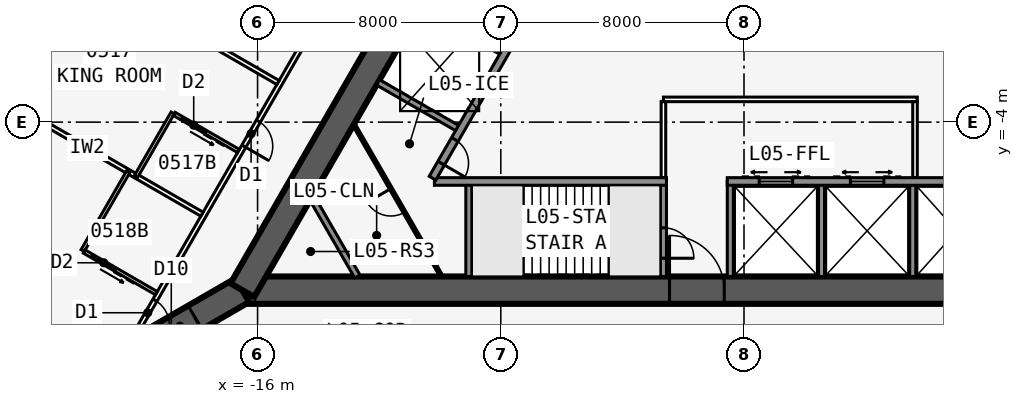
"""IFC4 building model, lengths in metres.
Left out: names, types, materials, properties, quantities, classifications, styles, units other than length and angle.
Written with IfcOpenShell. Run it as: python <this file> out.ifc"""

import sys

from ifc_helpers import new_model, si_unit, direction, frame, frame_2d, origin, place, context, subcontext, project, spatial, rectangle, extrude, element, fill, save


model = new_model("IFC4")
c1 = context("Model", 3, precision=1e-05, world=origin(), true_north=direction((0.0, 1.0)))
c2 = subcontext(c1, "Body", "Model", "MODEL_VIEW")
j1 = project(units=[si_unit("LENGTHUNIT", "METRE"), si_unit("PLANEANGLEUNIT", "RADIAN")], contexts=[c1])
p1 = place(None, origin())
s1 = spatial("IfcSite", under=j1, at=p1, CompositionType="ELEMENT")
p2 = place(p1, origin())
s2 = spatial("IfcBuilding", under=s1, at=p2, CompositionType="ELEMENT")
p3 = place(p2, frame((0.0, 0.0, 28.5)))
s3 = spatial("IfcBuildingStorey", under=s2, at=p3, CompositionType="ELEMENT", Elevation=28.5)
p4 = place(p3, frame((-16.5, -9.526, 0.0), z_axis=(0.0, 0.0, 1.0), x_axis=(1.0, 0.0, 0.0)))
e1 = element("IfcWall", 1, at=p4, inside=s3, PredefinedType="SHEAR", context=c2, shape_type="SweptSolid", body=[
    extrude(rectangle(XDim=33.0, YDim=0.9, at=frame_2d((16.5, 0.0))), origin(), (0.0, 0.0, 1.0), 3.4),
])
p5 = place(p4, frame((14.05, 0.0, 0.0)))
e2 = element("IfcOpeningElement", 2, at=p5, cuts=e1, PredefinedType="OPENING", context=c2, shape_type="SweptSolid", body=[
    extrude(rectangle(XDim=1.8, YDim=2.13, at=frame_2d((0.9, 1.065))), frame((0.0, 0.46, 0.0), z_axis=(0.0, -1.0, 0.0), x_axis=(1.0, 0.0, 0.0)), (0.0, 0.0, 1.0), 0.92),
])
p6 = place(p3, frame((-10.183, -5.951, 0.0), z_axis=(0.0, 0.0, 1.0), x_axis=(1.0, 0.0, 0.0)))
e3 = element("IfcWall", 3, at=p6, inside=s3, PredefinedType="SOLIDWALL", context=c2, shape_type="SweptSolid", body=[
    extrude(rectangle(XDim=7.633, YDim=0.25, at=frame_2d((3.816, 0.0))), origin(), (0.0, 0.0, 1.0), 3.235),
])
p7 = place(p3, frame((-0.55, -5.951, 0.0), z_axis=(0.0, 0.0, 1.0), x_axis=(1.0, 0.0, 0.0)))
e4 = element("IfcWall", 4, at=p7, inside=s3, PredefinedType="SOLIDWALL", context=c2, shape_type="SweptSolid", body=[
    extrude(rectangle(XDim=10.733, YDim=0.25, at=frame_2d((5.366, 0.0))), origin(), (0.0, 0.0, 1.0), 3.235),
])
p8 = place(p7, frame((9.314, 0.0, 0.0)))
e5 = element("IfcOpeningElement", 5, at=p8, cuts=e4, PredefinedType="OPENING", context=c2, shape_type="SweptSolid", body=[
    extrude(rectangle(XDim=0.9, YDim=2.13, at=frame_2d((0.45, 1.065))), frame((0.0, 0.135, 0.0), z_axis=(0.0, -1.0, 0.0), x_axis=(1.0, 0.0, 0.0)), (0.0, 0.0, 1.0), 0.27),
])
p9 = place(p7, frame((1.05, 0.0, 0.0)))
e6 = element("IfcOpeningElement", 6, at=p9, cuts=e4, PredefinedType="OPENING", context=c2, shape_type="SweptSolid", body=[
    extrude(rectangle(XDim=1.1, YDim=2.13, at=frame_2d((0.55, 1.065))), frame((0.0, 0.135, 0.0), z_axis=(0.0, -1.0, 0.0), x_axis=(1.0, 0.0, 0.0)), (0.0, 0.0, 1.0), 0.27),
])
p10 = place(p7, frame((4.05, 0.0, 0.0)))
e7 = element("IfcOpeningElement", 7, at=p10, cuts=e4, PredefinedType="OPENING", context=c2, shape_type="SweptSolid", body=[
    extrude(rectangle(XDim=1.1, YDim=2.13, at=frame_2d((0.55, 1.065))), frame((0.0, 0.135, 0.0), z_axis=(0.0, -1.0, 0.0), x_axis=(1.0, 0.0, 0.0)), (0.0, 0.0, 1.0), 0.27),
])
p11 = place(p3, frame((-9.05, -5.951, 0.0), z_axis=(0.0, 0.0, 1.0), x_axis=(0.0, -1.0, 0.0)))
e8 = element("IfcWall", 8, at=p11, inside=s3, PredefinedType="SOLIDWALL", context=c2, shape_type="SweptSolid", body=[
    extrude(rectangle(XDim=3.125, YDim=0.2, at=frame_2d((1.562, 0.0))), origin(), (0.0, 0.0, 1.0), 3.235),
])
p12 = place(p3, frame((-2.65, -5.951, 0.0), z_axis=(0.0, 0.0, 1.0), x_axis=(0.0, -1.0, 0.0)))
e9 = element("IfcWall", 9, at=p12, inside=s3, PredefinedType="SOLIDWALL", context=c2, shape_type="SweptSolid", body=[
    extrude(rectangle(XDim=3.125, YDim=0.2, at=frame_2d((1.562, 0.0))), origin(), (0.0, 0.0, 1.0), 3.235),
])
p13 = place(p12, frame((1.525, 0.0, 0.0)))
e10 = element("IfcOpeningElement", 10, at=p13, cuts=e9, PredefinedType="OPENING", context=c2, shape_type="SweptSolid", body=[
    extrude(rectangle(XDim=1.0, YDim=2.13, at=frame_2d((0.5, 1.065))), frame((0.0, 0.11, 0.0), z_axis=(0.0, -1.0, 0.0), x_axis=(1.0, 0.0, 0.0)), (0.0, 0.0, 1.0), 0.22),
])
for number, where, z_axis, x_axis in (
    (11, (-0.45, -5.951, 0.0), (0.0, 0.0, 1.0), (0.0, -1.0, 0.0)),
    (12, (2.55, -5.951, 0.0), (0.0, 0.0, 1.0), (0.0, -1.0, 0.0)),
    (13, (5.55, -5.951, 0.0), (0.0, 0.0, 1.0), (0.0, -1.0, 0.0)),
):
    element("IfcWall", number, at=place(p3, frame(where, z_axis=z_axis, x_axis=x_axis)), inside=s3, PredefinedType="SOLIDWALL", context=c2, shape_type="SweptSolid", body=[
        extrude(rectangle(XDim=3.125, YDim=0.2, at=frame_2d((1.562, 0.0))), origin(), (0.0, 0.0, 1.0), 3.235),
    ])
p14 = place(p3, frame((16.5, -9.526, 0.0), z_axis=(0.0, 0.0, 1.0), x_axis=(-0.499999749417, 0.866025548458, 0.0)))
e14 = element("IfcWall", 14, at=p14, inside=s3, PredefinedType="SHEAR", context=c2, shape_type="SweptSolid", body=[
    extrude(rectangle(XDim=33.0, YDim=0.9, at=frame_2d((16.5, 0.0))), origin(), (0.0, 0.0, 1.0), 3.4),
])
p15 = place(p14, frame((14.15, 0.0, 0.0)))
e15 = element("IfcOpeningElement", 15, at=p15, cuts=e14, PredefinedType="OPENING", context=c2, shape_type="SweptSolid", body=[
    extrude(rectangle(XDim=1.8, YDim=2.13, at=frame_2d((0.9, 1.065))), frame((0.0, 0.46, 0.0), z_axis=(0.0, -1.0, 0.0), x_axis=(1.0, 0.0, 0.0)), (0.0, 0.0, 1.0), 0.92),
])
p16 = place(p14, frame((12.6, 0.0, 0.0)))
e16 = element("IfcOpeningElement", 16, at=p16, cuts=e14, PredefinedType="OPENING", context=c2, shape_type="SweptSolid", body=[
    extrude(rectangle(XDim=1.0, YDim=2.13, at=frame_2d((0.5, 1.065))), frame((0.0, 0.46, 0.0), z_axis=(0.0, -1.0, 0.0), x_axis=(1.0, 0.0, 0.0)), (0.0, 0.0, 1.0), 0.92),
])
p17 = place(p3, frame((10.245, -5.843, 0.0), z_axis=(0.0, 0.0, 1.0), x_axis=(-0.499993009313, 0.866029439822, 0.0)))
e17 = element("IfcWall", 17, at=p17, inside=s3, PredefinedType="SOLIDWALL", context=c2, shape_type="SweptSolid", body=[
    extrude(rectangle(XDim=7.733, YDim=0.25, at=frame_2d((3.866, 0.0))), origin(), (0.0, 0.0, 1.0), 3.235),
])
p18 = place(p3, frame((0.0, 19.052, 0.0), z_axis=(0.0, 0.0, 1.0), x_axis=(-0.499999749417, -0.866025548458, 0.0)))
e18 = element("IfcWall", 18, at=p18, inside=s3, PredefinedType="SHEAR", context=c2, shape_type="SweptSolid", body=[
    extrude(rectangle(XDim=33.0, YDim=0.9, at=frame_2d((16.5, 0.0))), origin(), (0.0, 0.0, 1.0), 3.4),
])
p19 = place(p18, frame((14.15, 0.0, 0.0)))
e19 = element("IfcOpeningElement", 19, at=p19, cuts=e18, PredefinedType="OPENING", context=c2, shape_type="SweptSolid", body=[
    extrude(rectangle(XDim=1.8, YDim=2.13, at=frame_2d((0.9, 1.065))), frame((0.0, 0.46, 0.0), z_axis=(0.0, -1.0, 0.0), x_axis=(1.0, 0.0, 0.0)), (0.0, 0.0, 1.0), 0.92),
])
p20 = place(p18, frame((12.6, 0.0, 0.0)))
e20 = element("IfcOpeningElement", 20, at=p20, cuts=e18, PredefinedType="OPENING", context=c2, shape_type="SweptSolid", body=[
    extrude(rectangle(XDim=1.0, YDim=2.13, at=frame_2d((0.5, 1.065))), frame((0.0, 0.46, 0.0), z_axis=(0.0, -1.0, 0.0), x_axis=(1.0, 0.0, 0.0)), (0.0, 0.0, 1.0), 0.92),
])
p21 = place(p3, frame((-4.929, 3.365, 0.0), z_axis=(0.0, 0.0, 1.0), x_axis=(-0.499991433582, -0.866030349552, 0.0)))
e21 = element("IfcWall", 21, at=p21, inside=s3, PredefinedType="SOLIDWALL", context=c2, shape_type="SweptSolid", body=[
    extrude(rectangle(XDim=10.633, YDim=0.25, at=frame_2d((5.316, 0.0))), origin(), (0.0, 0.0, 1.0), 3.235),
])
p22 = place(p21, frame((9.164, 0.0, 0.0)))
e22 = element("IfcOpeningElement", 22, at=p22, cuts=e21, PredefinedType="OPENING", context=c2, shape_type="SweptSolid", body=[
    extrude(rectangle(XDim=0.9, YDim=2.13, at=frame_2d((0.45, 1.065))), frame((0.0, 0.135, 0.0), z_axis=(0.0, -1.0, 0.0), x_axis=(1.0, 0.0, 0.0)), (0.0, 0.0, 1.0), 0.27),
])
for number, where, z_axis, x_axis in (
    (23, (-7.879, -1.744, 0.0), (0.0, 0.0, 1.0), (-0.866, 0.5, 0.0)),
    (24, (-9.329, -4.256, 0.0), (0.0, 0.0, 1.0), (-0.866, 0.5, 0.0)),
):
    element("IfcWall", number, at=place(p3, frame(where, z_axis=z_axis, x_axis=x_axis)), inside=s3, PredefinedType="SOLIDWALL", context=c2, shape_type="SweptSolid", body=[
        extrude(rectangle(XDim=3.125, YDim=0.2, at=frame_2d((1.562, 0.0))), origin(), (0.0, 0.0, 1.0), 3.235),
    ])
p23 = place(p3, frame((-16.5, -9.526, 0.0), z_axis=(0.0, 0.0, 1.0), x_axis=(-0.866031398331, -0.499989616998, 0.0)))
e25 = element("IfcWall", 25, at=p23, inside=s3, PredefinedType="SHEAR", context=c2, shape_type="SweptSolid", body=[
    extrude(rectangle(XDim=4.746, YDim=0.9, at=frame_2d((2.373, 0.0))), origin(), (0.0, 0.0, 1.0), 3.4),
])
p24 = place(p23, frame((1.8, 0.0, 0.0)))
e26 = element("IfcOpeningElement", 26, at=p24, cuts=e25, PredefinedType="OPENING", context=c2, shape_type="SweptSolid", body=[
    extrude(rectangle(XDim=1.8, YDim=2.13, at=frame_2d((0.9, 1.065))), frame((0.0, 0.46, 0.0), z_axis=(0.0, -1.0, 0.0), x_axis=(1.0, 0.0, 0.0)), (0.0, 0.0, 1.0), 0.92),
])
p25 = place(p3, frame((20.027, -10.985, 0.0), z_axis=(0.0, 0.0, 1.0), x_axis=(-0.500001677587, 0.866024435227, 0.0)))
e27 = element("IfcWall", 27, at=p25, inside=s3, PredefinedType="PARTITIONING", context=c2, shape_type="SweptSolid", body=[
    extrude(rectangle(XDim=39.054, YDim=0.15, at=frame_2d((19.527, 0.0))), origin(), (0.0, 0.0, 1.0), 3.235),
])
p26 = place(p25, frame((0.352, 0.0, 0.0)))
e28 = element("IfcOpeningElement", 28, at=p26, cuts=e27, PredefinedType="OPENING", context=c2, shape_type="SweptSolid", body=[
    extrude(rectangle(XDim=0.95, YDim=2.13, at=frame_2d((0.475, 1.065))), frame((0.0, 0.085, 0.0), z_axis=(0.0, -1.0, 0.0), x_axis=(1.0, 0.0, 0.0)), (0.0, 0.0, 1.0), 0.17),
])
p27 = place(p25, frame((5.952, 0.0, 0.0)))
e29 = element("IfcOpeningElement", 29, at=p27, cuts=e27, PredefinedType="OPENING", context=c2, shape_type="SweptSolid", body=[
    extrude(rectangle(XDim=0.95, YDim=2.13, at=frame_2d((0.475, 1.065))), frame((0.0, 0.085, 0.0), z_axis=(0.0, -1.0, 0.0), x_axis=(1.0, 0.0, 0.0)), (0.0, 0.0, 1.0), 0.17),
])
p28 = place(p25, frame((12.152, 0.0, 0.0)))
e30 = element("IfcOpeningElement", 30, at=p28, cuts=e27, PredefinedType="OPENING", context=c2, shape_type="SweptSolid", body=[
    extrude(rectangle(XDim=0.95, YDim=2.13, at=frame_2d((0.475, 1.065))), frame((0.0, 0.085, 0.0), z_axis=(0.0, -1.0, 0.0), x_axis=(1.0, 0.0, 0.0)), (0.0, 0.0, 1.0), 0.17),
])
p29 = place(p25, frame((15.952, 0.0, 0.0)))
e31 = element("IfcOpeningElement", 31, at=p29, cuts=e27, PredefinedType="OPENING", context=c2, shape_type="SweptSolid", body=[
    extrude(rectangle(XDim=0.95, YDim=2.13, at=frame_2d((0.475, 1.065))), frame((0.0, 0.085, 0.0), z_axis=(0.0, -1.0, 0.0), x_axis=(1.0, 0.0, 0.0)), (0.0, 0.0, 1.0), 0.17),
])
p30 = place(p25, frame((22.152, 0.0, 0.0)))
e32 = element("IfcOpeningElement", 32, at=p30, cuts=e27, PredefinedType="OPENING", context=c2, shape_type="SweptSolid", body=[
    extrude(rectangle(XDim=0.95, YDim=2.13, at=frame_2d((0.475, 1.065))), frame((0.0, 0.085, 0.0), z_axis=(0.0, -1.0, 0.0), x_axis=(1.0, 0.0, 0.0)), (0.0, 0.0, 1.0), 0.17),
])
p31 = place(p25, frame((25.952, 0.0, 0.0)))
e33 = element("IfcOpeningElement", 33, at=p31, cuts=e27, PredefinedType="OPENING", context=c2, shape_type="SweptSolid", body=[
    extrude(rectangle(XDim=0.95, YDim=2.13, at=frame_2d((0.475, 1.065))), frame((0.0, 0.085, 0.0), z_axis=(0.0, -1.0, 0.0), x_axis=(1.0, 0.0, 0.0)), (0.0, 0.0, 1.0), 0.17),
])
p32 = place(p25, frame((36.546, 0.0, 0.0)))
e34 = element("IfcOpeningElement", 34, at=p32, cuts=e27, PredefinedType="OPENING", context=c2, shape_type="SweptSolid", body=[
    extrude(rectangle(XDim=0.95, YDim=2.13, at=frame_2d((0.475, 1.065))), frame((0.0, 0.085, 0.0), z_axis=(0.0, -1.0, 0.0), x_axis=(1.0, 0.0, 0.0)), (0.0, 0.0, 1.0), 0.17),
])
p33 = place(p3, frame((-0.5, 22.836, 0.0), z_axis=(0.0, 0.0, 1.0), x_axis=(-0.500001677587, -0.866024435227, 0.0)))
e35 = element("IfcWall", 35, at=p33, inside=s3, PredefinedType="PARTITIONING", context=c2, shape_type="SweptSolid", body=[
    extrude(rectangle(XDim=39.054, YDim=0.15, at=frame_2d((19.527, 0.0))), origin(), (0.0, 0.0, 1.0), 3.235),
])
p34 = place(p33, frame((1.558, 0.0, 0.0)))
e36 = element("IfcOpeningElement", 36, at=p34, cuts=e35, PredefinedType="OPENING", context=c2, shape_type="SweptSolid", body=[
    extrude(rectangle(XDim=0.95, YDim=2.13, at=frame_2d((0.475, 1.065))), frame((0.0, 0.085, 0.0), z_axis=(0.0, -1.0, 0.0), x_axis=(1.0, 0.0, 0.0)), (0.0, 0.0, 1.0), 0.17),
])
p35 = place(p33, frame((15.352, 0.0, 0.0)))
e37 = element("IfcOpeningElement", 37, at=p35, cuts=e35, PredefinedType="OPENING", context=c2, shape_type="SweptSolid", body=[
    extrude(rectangle(XDim=0.95, YDim=2.13, at=frame_2d((0.475, 1.065))), frame((0.0, 0.085, 0.0), z_axis=(0.0, -1.0, 0.0), x_axis=(1.0, 0.0, 0.0)), (0.0, 0.0, 1.0), 0.17),
])
p36 = place(p33, frame((22.752, 0.0, 0.0)))
e38 = element("IfcOpeningElement", 38, at=p36, cuts=e35, PredefinedType="OPENING", context=c2, shape_type="SweptSolid", body=[
    extrude(rectangle(XDim=0.95, YDim=2.13, at=frame_2d((0.475, 1.065))), frame((0.0, 0.085, 0.0), z_axis=(0.0, -1.0, 0.0), x_axis=(1.0, 0.0, 0.0)), (0.0, 0.0, 1.0), 0.17),
])
p37 = place(p33, frame((30.952, 0.0, 0.0)))
e39 = element("IfcOpeningElement", 39, at=p37, cuts=e35, PredefinedType="OPENING", context=c2, shape_type="SweptSolid", body=[
    extrude(rectangle(XDim=0.95, YDim=2.13, at=frame_2d((0.475, 1.065))), frame((0.0, 0.085, 0.0), z_axis=(0.0, -1.0, 0.0), x_axis=(1.0, 0.0, 0.0)), (0.0, 0.0, 1.0), 0.17),
])
p38 = place(p33, frame((37.752, 0.0, 0.0)))
e40 = element("IfcOpeningElement", 40, at=p38, cuts=e35, PredefinedType="OPENING", context=c2, shape_type="SweptSolid", body=[
    extrude(rectangle(XDim=0.95, YDim=2.13, at=frame_2d((0.475, 1.065))), frame((0.0, 0.085, 0.0), z_axis=(0.0, -1.0, 0.0), x_axis=(1.0, 0.0, 0.0)), (0.0, 0.0, 1.0), 0.17),
])
p39 = place(p3, frame((-15.329, -2.697, 0.0), z_axis=(0.0, 0.0, 1.0), x_axis=(-0.866018409083, 0.500012114982, 0.0)))
e41 = element("IfcWall", 41, at=p39, inside=s3, PredefinedType="PARTITIONING", context=c2, shape_type="SweptSolid", body=[
    extrude(rectangle(XDim=9.485, YDim=0.15, at=frame_2d((4.742, 0.0))), origin(), (0.0, 0.0, 1.0), 2.389),
])
p40 = place(p3, frame((-17.829, -7.027, 0.0), z_axis=(0.0, 0.0, 1.0), x_axis=(-0.866032659912, 0.499987431809, 0.0)))
e42 = element("IfcWall", 42, at=p40, inside=s3, PredefinedType="PARTITIONING", context=c2, shape_type="SweptSolid", body=[
    extrude(rectangle(XDim=8.72, YDim=0.15, at=frame_2d((4.36, 0.0))), origin(), (0.0, 0.0, 1.0), 2.389),
])
p41 = place(p3, frame((-18.793, -3.699, 0.0), z_axis=(0.0, 0.0, 1.0), x_axis=(-0.500001309137, -0.866024647952, 0.0)))
e43 = element("IfcWall", 43, at=p41, inside=s3, PredefinedType="PLUMBINGWALL", context=c2, shape_type="SweptSolid", body=[
    extrude(rectangle(XDim=2.4, YDim=0.12, at=frame_2d((1.2, 0.0))), origin(), (0.0, 0.0, 1.0), 3.235),
])
p42 = place(p3, frame((-16.628, -4.949, 0.0), z_axis=(0.0, 0.0, 1.0), x_axis=(-0.866048967903, 0.499959183527, 0.0)))
e44 = element("IfcWall", 44, at=p42, inside=s3, PredefinedType="PLUMBINGWALL", context=c2, shape_type="SweptSolid", body=[
    extrude(rectangle(XDim=2.44, YDim=0.12, at=frame_2d((1.22, 0.0))), origin(), (0.0, 0.0, 1.0), 3.235),
])
p43 = place(p42, frame((1.25, 0.0, 0.0)))
e45 = element("IfcOpeningElement", 45, at=p43, cuts=e44, PredefinedType="OPENING", context=c2, shape_type="SweptSolid", body=[
    extrude(rectangle(XDim=0.9, YDim=2.13, at=frame_2d((0.45, 1.065))), frame((0.0, 0.07, 0.0), z_axis=(0.0, -1.0, 0.0), x_axis=(1.0, 0.0, 0.0)), (0.0, 0.0, 1.0), 0.14),
])
p44 = place(p3, frame((-20.253, -5.627, 0.0), z_axis=(0.0, 0.0, 1.0), x_axis=(-0.499990139034, -0.866031096941, 0.0)))
e46 = element("IfcWall", 46, at=p44, inside=s3, PredefinedType="PLUMBINGWALL", context=c2, shape_type="SweptSolid", body=[
    extrude(rectangle(XDim=3.0, YDim=0.12, at=frame_2d((1.5, 0.0))), origin(), (0.0, 0.0, 1.0), 3.235),
])
p45 = place(p3, frame((-19.329, -9.625, 0.0), z_axis=(0.0, 0.0, 1.0), x_axis=(-0.866035715982, 0.499982138324, 0.0)))
e47 = element("IfcWall", 47, at=p45, inside=s3, PredefinedType="PLUMBINGWALL", context=c2, shape_type="SweptSolid", body=[
    extrude(rectangle(XDim=2.74, YDim=0.12, at=frame_2d((1.37, 0.0))), origin(), (0.0, 0.0, 1.0), 3.235),
])
p46 = place(p45, frame((1.55, 0.0, 0.0)))
e48 = element("IfcOpeningElement", 48, at=p46, cuts=e47, PredefinedType="OPENING", context=c2, shape_type="SweptSolid", body=[
    extrude(rectangle(XDim=0.9, YDim=2.13, at=frame_2d((0.45, 1.065))), frame((0.0, 0.07, 0.0), z_axis=(0.0, -1.0, 0.0), x_axis=(1.0, 0.0, 0.0)), (0.0, 0.0, 1.0), 0.14),
])
p47 = place(p3, frame((-2.65, -3.251, 0.0), z_axis=(0.0, 0.0, 1.0), x_axis=(1.0, 0.0, 0.0)))
e49 = element("IfcWall", 49, at=p47, inside=s3, PredefinedType="PARTITIONING", context=c2, shape_type="SweptSolid", body=[
    extrude(rectangle(XDim=8.35, YDim=0.15, at=frame_2d((4.175, 0.0))), origin(), (0.0, 0.0, 1.0), 3.235),
])
for number, where, z_axis, x_axis in (
    (50, (-2.65, -5.826, 0.0), (0.0, 0.0, 1.0), (0.0, 1.0, 0.0)),
    (51, (5.625, -5.826, 0.0), (0.0, 0.0, 1.0), (0.0, 1.0, 0.0)),
):
    element("IfcWall", number, at=place(p3, frame(where, z_axis=z_axis, x_axis=x_axis)), inside=s3, PredefinedType="PARTITIONING", context=c2, shape_type="SweptSolid", body=[
        extrude(rectangle(XDim=2.5, YDim=0.15, at=frame_2d((1.25, 0.0))), origin(), (0.0, 0.0, 1.0), 3.235),
    ])
p48 = place(p3, frame((-12.719, -9.076, 0.0), z_axis=(0.0, 0.0, 1.0), x_axis=(-0.499952404951, 0.866052881055, 0.0)))
e52 = element("IfcWall", 52, at=p48, inside=s3, PredefinedType="SOLIDWALL", context=c2, shape_type="SweptSolid", body=[
    extrude(rectangle(XDim=3.002, YDim=0.2, at=frame_2d((1.501, 0.0))), origin(), (0.0, 0.0, 1.0), 3.235),
])
p49 = place(p3, frame((-9.947, -9.076, 0.0), z_axis=(0.0, 0.0, 1.0), x_axis=(-0.500027479704, 0.866009537788, 0.0)))
e53 = element("IfcWall", 53, at=p49, inside=s3, PredefinedType="PARTITIONING", context=c2, shape_type="SweptSolid", body=[
    extrude(rectangle(XDim=5.774, YDim=0.1, at=frame_2d((2.887, 0.0))), origin(), (0.0, 0.0, 1.0), 3.235),
])
p50 = place(p49, frame((2.437, 0.0, 0.0)))
e54 = element("IfcOpeningElement", 54, at=p50, cuts=e53, PredefinedType="OPENING", context=c2, shape_type="SweptSolid", body=[
    extrude(rectangle(XDim=0.9, YDim=2.13, at=frame_2d((0.45, 1.065))), frame((0.0, 0.06, 0.0), z_axis=(0.0, -1.0, 0.0), x_axis=(1.0, 0.0, 0.0)), (0.0, 0.0, 1.0), 0.12),
])
p51 = place(p3, frame((-7.247, -7.576, 0.0), z_axis=(0.0, 0.0, 1.0), x_axis=(1.0, 0.0, 0.0)))
e55 = element("IfcWall", 55, at=p51, inside=s3, PredefinedType="SOLIDWALL", context=c2, shape_type="SweptSolid", body=[
    extrude(rectangle(XDim=2.794, YDim=0.1, at=frame_2d((1.397, 0.0))), origin(), (0.0, 0.0, 1.0), 3.4),
])
p52 = place(p43, origin())
e56 = element("IfcDoor", 56, at=p52, inside=s3, OperationType="SLIDING_TO_LEFT", PredefinedType="DOOR", context=c2, shape_type="SweptSolid", body=[
    extrude(rectangle(XDim=0.9, YDim=2.13, at=frame_2d((0.45, 1.065))), frame((0.0, 0.025, 0.0), z_axis=(0.0, -1.0, 0.0), x_axis=(1.0, 0.0, 0.0)), (0.0, 0.0, 1.0), 0.05),
])
fill(e45, e56)
p53 = place(p37, origin())
e57 = element("IfcDoor", 57, at=p53, inside=s3, OperationType="SINGLE_SWING_RIGHT", PredefinedType="DOOR", context=c2, shape_type="SweptSolid", body=[
    extrude(rectangle(XDim=0.95, YDim=2.13, at=frame_2d((0.475, 1.065))), frame((0.0, 0.025, 0.0), z_axis=(0.0, -1.0, 0.0), x_axis=(1.0, 0.0, 0.0)), (0.0, 0.0, 1.0), 0.05),
])
fill(e39, e57)
p54 = place(p46, origin())
e58 = element("IfcDoor", 58, at=p54, inside=s3, OperationType="SLIDING_TO_LEFT", PredefinedType="DOOR", context=c2, shape_type="SweptSolid", body=[
    extrude(rectangle(XDim=0.9, YDim=2.13, at=frame_2d((0.45, 1.065))), frame((0.0, 0.025, 0.0), z_axis=(0.0, -1.0, 0.0), x_axis=(1.0, 0.0, 0.0)), (0.0, 0.0, 1.0), 0.05),
])
fill(e48, e58)
p55 = place(p38, origin())
e59 = element("IfcDoor", 59, at=p55, inside=s3, OperationType="SINGLE_SWING_RIGHT", PredefinedType="DOOR", context=c2, shape_type="SweptSolid", body=[
    extrude(rectangle(XDim=0.95, YDim=2.13, at=frame_2d((0.475, 1.065))), frame((0.0, 0.025, 0.0), z_axis=(0.0, -1.0, 0.0), x_axis=(1.0, 0.0, 0.0)), (0.0, 0.0, 1.0), 0.05),
])
fill(e40, e59)
p56 = place(p5, origin())
e60 = element("IfcDoor", 60, at=p56, inside=s3, OperationType="DOUBLE_DOOR_SINGLE_SWING", PredefinedType="DOOR", context=c2, shape_type="SweptSolid", body=[
    extrude(rectangle(XDim=1.8, YDim=2.13, at=frame_2d((0.9, 1.065))), frame((0.0, 0.025, 0.0), z_axis=(0.0, -1.0, 0.0), x_axis=(1.0, 0.0, 0.0)), (0.0, 0.0, 1.0), 0.05),
])
fill(e2, e60)
p57 = place(p13, origin())
e61 = element("IfcDoor", 61, at=p57, inside=s3, OperationType="SINGLE_SWING_RIGHT", PredefinedType="DOOR", context=c2, shape_type="SweptSolid", body=[
    extrude(rectangle(XDim=1.0, YDim=2.13, at=frame_2d((0.5, 1.065))), frame((0.0, 0.025, 0.0), z_axis=(0.0, -1.0, 0.0), x_axis=(1.0, 0.0, 0.0)), (0.0, 0.0, 1.0), 0.05),
])
fill(e10, e61)
p58 = place(p24, origin())
e62 = element("IfcDoor", 62, at=p58, inside=s3, OperationType="DOUBLE_DOOR_DOUBLE_SWING", PredefinedType="DOOR", context=c2, shape_type="SweptSolid", body=[
    extrude(rectangle(XDim=1.8, YDim=2.13, at=frame_2d((0.9, 1.065))), frame((0.0, 0.025, 0.0), z_axis=(0.0, -1.0, 0.0), x_axis=(1.0, 0.0, 0.0)), (0.0, 0.0, 1.0), 0.05),
])
fill(e26, e62)
p59 = place(p50, origin())
e63 = element("IfcDoor", 63, at=p59, inside=s3, OperationType="SINGLE_SWING_RIGHT", PredefinedType="DOOR", context=c2, shape_type="SweptSolid", body=[
    extrude(rectangle(XDim=0.9, YDim=2.13, at=frame_2d((0.45, 1.065))), frame((0.0, 0.025, 0.0), z_axis=(0.0, -1.0, 0.0), x_axis=(1.0, 0.0, 0.0)), (0.0, 0.0, 1.0), 0.05),
])
fill(e54, e63)
p60 = place(p22, origin())
e64 = element("IfcDoor", 64, at=p60, inside=s3, OperationType="SINGLE_SWING_RIGHT", PredefinedType="DOOR", context=c2, shape_type="SweptSolid", body=[
    extrude(rectangle(XDim=0.9, YDim=2.13, at=frame_2d((0.45, 1.065))), frame((0.0, 0.025, 0.0), z_axis=(0.0, -1.0, 0.0), x_axis=(1.0, 0.0, 0.0)), (0.0, 0.0, 1.0), 0.05),
])
fill(e22, e64)
p61 = place(p9, origin())
e65 = element("IfcDoor", 65, at=p61, inside=s3, OperationType="DOUBLE_DOOR_SLIDING", PredefinedType="USERDEFINED", context=c2, shape_type="SweptSolid", body=[
    extrude(rectangle(XDim=1.1, YDim=2.13, at=frame_2d((0.55, 1.065))), frame((0.0, 0.025, 0.0), z_axis=(0.0, -1.0, 0.0), x_axis=(1.0, 0.0, 0.0)), (0.0, 0.0, 1.0), 0.05),
])
fill(e6, e65)
p62 = place(p10, origin())
e66 = element("IfcDoor", 66, at=p62, inside=s3, OperationType="DOUBLE_DOOR_SLIDING", PredefinedType="USERDEFINED", context=c2, shape_type="SweptSolid", body=[
    extrude(rectangle(XDim=1.1, YDim=2.13, at=frame_2d((0.55, 1.065))), frame((0.0, 0.025, 0.0), z_axis=(0.0, -1.0, 0.0), x_axis=(1.0, 0.0, 0.0)), (0.0, 0.0, 1.0), 0.05),
])
fill(e7, e66)
save(model, sys.argv[1])
